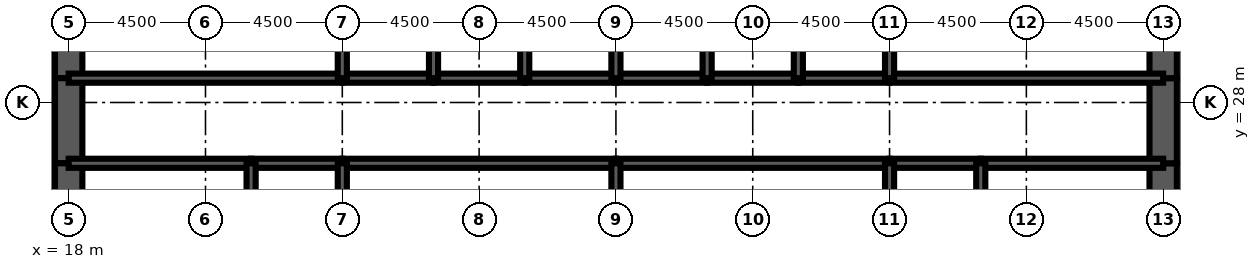
"""IFC4 building model, lengths in metres.
Left out: names, types, materials, properties, quantities, classifications, styles, units other than length and angle.
Written with IfcOpenShell. Run it as: python <this file> out.ifc"""

import sys

from ifc_helpers import new_model, si_unit, direction, frame, frame_2d, origin, place, context, subcontext, project, spatial, rectangle, extrude, element, fill, save


model = new_model("IFC4")
c1 = context("Model", 3, precision=1e-05, world=origin(), true_north=direction((0.0, 1.0)))
c2 = subcontext(c1, "Body", "Model", "MODEL_VIEW")
j1 = project(units=[si_unit("LENGTHUNIT", "METRE"), si_unit("PLANEANGLEUNIT", "RADIAN")], contexts=[c1])
p1 = place(None, origin())
s1 = spatial("IfcSite", under=j1, at=p1, CompositionType="ELEMENT")
p2 = place(p1, origin())
s2 = spatial("IfcBuilding", under=s1, at=p2, CompositionType="ELEMENT")
p3 = place(p2, frame((0.0, 0.0, 50.0)))
s3 = spatial("IfcBuildingStorey", under=s2, at=p3, CompositionType="ELEMENT", Elevation=50.0)
p4 = place(p3, frame((18.0, 32.0, 0.0), z_axis=(0.0, 0.0, 1.0), x_axis=(0.0, -1.0, 0.0)))
e1 = element("IfcWall", 1, at=p4, inside=s3, PredefinedType="SHEAR", context=c2, shape_type="SweptSolid", body=[
    extrude(rectangle(XDim=3.2, YDim=0.9, at=frame_2d((1.6, 0.0))), origin(), (0.0, 0.0, 1.0), 4.5),
])
p5 = place(p3, frame((18.0, 28.8, 0.0), z_axis=(0.0, 0.0, 1.0), x_axis=(0.0, -1.0, 0.0)))
e2 = element("IfcWall", 2, at=p5, inside=s3, PredefinedType="SHEAR", context=c2, shape_type="SweptSolid", body=[
    extrude(rectangle(XDim=2.8, YDim=0.9, at=frame_2d((1.4, 0.0))), origin(), (0.0, 0.0, 1.0), 4.5),
])
p6 = place(p5, frame((0.4, 0.0, 0.0)))
e3 = element("IfcOpeningElement", 3, at=p6, cuts=e2, PredefinedType="OPENING", context=c2, shape_type="SweptSolid", body=[
    extrude(rectangle(XDim=1.8, YDim=2.1, at=frame_2d((0.9, 1.05))), frame((0.0, 0.46, 0.0), z_axis=(0.0, -1.0, 0.0), x_axis=(1.0, 0.0, 0.0)), (0.0, 0.0, 1.0), 0.92),
])
for number, where, z_axis, x_axis in (
    (4, (18.0, 26.0, 0.0), (0.0, 0.0, 1.0), (0.0, -1.0, 0.0)),
    (5, (54.0, 22.0, 0.0), (0.0, 0.0, 1.0), (0.0, 1.0, 0.0)),
):
    element("IfcWall", number, at=place(p3, frame(where, z_axis=z_axis, x_axis=x_axis)), inside=s3, PredefinedType="SHEAR", context=c2, shape_type="SweptSolid", body=[
        extrude(rectangle(XDim=4.0, YDim=0.9, at=frame_2d((2.0, 0.0))), origin(), (0.0, 0.0, 1.0), 4.5),
    ])
p7 = place(p3, frame((54.0, 26.0, 0.0), z_axis=(0.0, 0.0, 1.0), x_axis=(0.0, 1.0, 0.0)))
e6 = element("IfcWall", 6, at=p7, inside=s3, PredefinedType="SHEAR", context=c2, shape_type="SweptSolid", body=[
    extrude(rectangle(XDim=2.8, YDim=0.9, at=frame_2d((1.4, 0.0))), origin(), (0.0, 0.0, 1.0), 4.5),
])
p8 = place(p7, frame((0.6, 0.0, 0.0)))
e7 = element("IfcOpeningElement", 7, at=p8, cuts=e6, PredefinedType="OPENING", context=c2, shape_type="SweptSolid", body=[
    extrude(rectangle(XDim=1.8, YDim=2.1, at=frame_2d((0.9, 1.05))), frame((0.0, 0.46, 0.0), z_axis=(0.0, -1.0, 0.0), x_axis=(1.0, 0.0, 0.0)), (0.0, 0.0, 1.0), 0.92),
])
p9 = place(p3, frame((54.0, 28.8, 0.0), z_axis=(0.0, 0.0, 1.0), x_axis=(0.0, 1.0, 0.0)))
e8 = element("IfcWall", 8, at=p9, inside=s3, PredefinedType="SHEAR", context=c2, shape_type="SweptSolid", body=[
    extrude(rectangle(XDim=3.2, YDim=0.9, at=frame_2d((1.6, 0.0))), origin(), (0.0, 0.0, 1.0), 4.5),
])
p10 = place(p3, frame((18.0, 28.8, 0.0), z_axis=(0.0, 0.0, 1.0), x_axis=(1.0, 0.0, 0.0)))
e9 = element("IfcWall", 9, at=p10, inside=s3, PredefinedType="SOLIDWALL", context=c2, shape_type="SweptSolid", body=[
    extrude(rectangle(XDim=9.0, YDim=0.3, at=frame_2d((4.5, 0.0))), origin(), (0.0, 0.0, 1.0), 4.5),
])
p11 = place(p10, frame((0.65, 0.0, 0.0)))
e10 = element("IfcOpeningElement", 10, at=p11, cuts=e9, PredefinedType="OPENING", context=c2, shape_type="SweptSolid", body=[
    extrude(rectangle(XDim=1.0, YDim=2.1, at=frame_2d((0.5, 1.05))), frame((0.0, 0.16, 0.0), z_axis=(0.0, -1.0, 0.0), x_axis=(1.0, 0.0, 0.0)), (0.0, 0.0, 1.0), 0.32),
])
p12 = place(p3, frame((27.0, 28.8, 0.0), z_axis=(0.0, 0.0, 1.0), x_axis=(1.0, 0.0, 0.0)))
e11 = element("IfcWall", 11, at=p12, inside=s3, PredefinedType="SOLIDWALL", context=c2, shape_type="SweptSolid", body=[
    extrude(rectangle(XDim=3.0, YDim=0.3, at=frame_2d((1.5, 0.0))), origin(), (0.0, 0.0, 1.0), 4.5),
])
p13 = place(p12, frame((0.95, 0.0, 0.0)))
e12 = element("IfcOpeningElement", 12, at=p13, cuts=e11, PredefinedType="OPENING", context=c2, shape_type="SweptSolid", body=[
    extrude(rectangle(XDim=1.1, YDim=2.2, at=frame_2d((0.55, 1.1))), frame((0.0, 0.16, 0.0), z_axis=(0.0, -1.0, 0.0), x_axis=(1.0, 0.0, 0.0)), (0.0, 0.0, 1.0), 0.32),
])
p14 = place(p3, frame((30.0, 28.8, 0.0), z_axis=(0.0, 0.0, 1.0), x_axis=(1.0, 0.0, 0.0)))
e13 = element("IfcWall", 13, at=p14, inside=s3, PredefinedType="SOLIDWALL", context=c2, shape_type="SweptSolid", body=[
    extrude(rectangle(XDim=3.0, YDim=0.3, at=frame_2d((1.5, 0.0))), origin(), (0.0, 0.0, 1.0), 4.5),
])
p15 = place(p14, frame((0.95, 0.0, 0.0)))
e14 = element("IfcOpeningElement", 14, at=p15, cuts=e13, PredefinedType="OPENING", context=c2, shape_type="SweptSolid", body=[
    extrude(rectangle(XDim=1.1, YDim=2.2, at=frame_2d((0.55, 1.1))), frame((0.0, 0.16, 0.0), z_axis=(0.0, -1.0, 0.0), x_axis=(1.0, 0.0, 0.0)), (0.0, 0.0, 1.0), 0.32),
])
p16 = place(p3, frame((33.0, 28.8, 0.0), z_axis=(0.0, 0.0, 1.0), x_axis=(1.0, 0.0, 0.0)))
e15 = element("IfcWall", 15, at=p16, inside=s3, PredefinedType="SOLIDWALL", context=c2, shape_type="SweptSolid", body=[
    extrude(rectangle(XDim=3.0, YDim=0.3, at=frame_2d((1.5, 0.0))), origin(), (0.0, 0.0, 1.0), 4.5),
])
p17 = place(p16, frame((0.95, 0.0, 0.0)))
e16 = element("IfcOpeningElement", 16, at=p17, cuts=e15, PredefinedType="OPENING", context=c2, shape_type="SweptSolid", body=[
    extrude(rectangle(XDim=1.1, YDim=2.2, at=frame_2d((0.55, 1.1))), frame((0.0, 0.16, 0.0), z_axis=(0.0, -1.0, 0.0), x_axis=(1.0, 0.0, 0.0)), (0.0, 0.0, 1.0), 0.32),
])
for number, where, z_axis, x_axis in (
    (17, (36.0, 28.8, 0.0), (0.0, 0.0, 1.0), (1.0, 0.0, 0.0)),
    (18, (39.0, 28.8, 0.0), (0.0, 0.0, 1.0), (1.0, 0.0, 0.0)),
):
    element("IfcWall", number, at=place(p3, frame(where, z_axis=z_axis, x_axis=x_axis)), inside=s3, PredefinedType="SOLIDWALL", context=c2, shape_type="SweptSolid", body=[
        extrude(rectangle(XDim=3.0, YDim=0.3, at=frame_2d((1.5, 0.0))), origin(), (0.0, 0.0, 1.0), 4.5),
    ])
p18 = place(p3, frame((42.0, 28.8, 0.0), z_axis=(0.0, 0.0, 1.0), x_axis=(1.0, 0.0, 0.0)))
e19 = element("IfcWall", 19, at=p18, inside=s3, PredefinedType="SOLIDWALL", context=c2, shape_type="SweptSolid", body=[
    extrude(rectangle(XDim=3.0, YDim=0.3, at=frame_2d((1.5, 0.0))), origin(), (0.0, 0.0, 1.0), 4.5),
])
p19 = place(p18, frame((0.95, 0.0, 0.0)))
e20 = element("IfcOpeningElement", 20, at=p19, cuts=e19, PredefinedType="OPENING", context=c2, shape_type="SweptSolid", body=[
    extrude(rectangle(XDim=1.1, YDim=2.2, at=frame_2d((0.55, 1.1))), frame((0.0, 0.16, 0.0), z_axis=(0.0, -1.0, 0.0), x_axis=(1.0, 0.0, 0.0)), (0.0, 0.0, 1.0), 0.32),
])
p20 = place(p3, frame((45.0, 28.8, 0.0), z_axis=(0.0, 0.0, 1.0), x_axis=(1.0, 0.0, 0.0)))
e21 = element("IfcWall", 21, at=p20, inside=s3, PredefinedType="SOLIDWALL", context=c2, shape_type="SweptSolid", body=[
    extrude(rectangle(XDim=9.0, YDim=0.3, at=frame_2d((4.5, 0.0))), origin(), (0.0, 0.0, 1.0), 4.5),
])
p21 = place(p20, frame((7.35, 0.0, 0.0)))
e22 = element("IfcOpeningElement", 22, at=p21, cuts=e21, PredefinedType="OPENING", context=c2, shape_type="SweptSolid", body=[
    extrude(rectangle(XDim=1.0, YDim=2.1, at=frame_2d((0.5, 1.05))), frame((0.0, 0.16, 0.0), z_axis=(0.0, -1.0, 0.0), x_axis=(1.0, 0.0, 0.0)), (0.0, 0.0, 1.0), 0.32),
])
p22 = place(p3, frame((18.0, 26.0, 0.0), z_axis=(0.0, 0.0, 1.0), x_axis=(1.0, 0.0, 0.0)))
e23 = element("IfcWall", 23, at=p22, inside=s3, PredefinedType="SOLIDWALL", context=c2, shape_type="SweptSolid", body=[
    extrude(rectangle(XDim=6.0, YDim=0.3, at=frame_2d((3.0, 0.0))), origin(), (0.0, 0.0, 1.0), 4.5),
])
p23 = place(p3, frame((24.0, 26.0, 0.0), z_axis=(0.0, 0.0, 1.0), x_axis=(1.0, 0.0, 0.0)))
e24 = element("IfcWall", 24, at=p23, inside=s3, PredefinedType="SOLIDWALL", context=c2, shape_type="SweptSolid", body=[
    extrude(rectangle(XDim=3.0, YDim=0.3, at=frame_2d((1.5, 0.0))), origin(), (0.0, 0.0, 1.0), 4.5),
])
for number, where, z_axis, x_axis in (
    (25, (27.0, 26.0, 0.0), (0.0, 0.0, 1.0), (1.0, 0.0, 0.0)),
    (26, (36.0, 26.0, 0.0), (0.0, 0.0, 1.0), (1.0, 0.0, 0.0)),
):
    element("IfcWall", number, at=place(p3, frame(where, z_axis=z_axis, x_axis=x_axis)), inside=s3, PredefinedType="SOLIDWALL", context=c2, shape_type="SweptSolid", body=[
        extrude(rectangle(XDim=9.0, YDim=0.3, at=frame_2d((4.5, 0.0))), origin(), (0.0, 0.0, 1.0), 4.5),
    ])
p24 = place(p3, frame((45.0, 26.0, 0.0), z_axis=(0.0, 0.0, 1.0), x_axis=(1.0, 0.0, 0.0)))
e27 = element("IfcWall", 27, at=p24, inside=s3, PredefinedType="SOLIDWALL", context=c2, shape_type="SweptSolid", body=[
    extrude(rectangle(XDim=3.0, YDim=0.3, at=frame_2d((1.5, 0.0))), origin(), (0.0, 0.0, 1.0), 4.5),
])
p25 = place(p3, frame((48.0, 26.0, 0.0), z_axis=(0.0, 0.0, 1.0), x_axis=(1.0, 0.0, 0.0)))
e28 = element("IfcWall", 28, at=p25, inside=s3, PredefinedType="SOLIDWALL", context=c2, shape_type="SweptSolid", body=[
    extrude(rectangle(XDim=6.0, YDim=0.3, at=frame_2d((3.0, 0.0))), origin(), (0.0, 0.0, 1.0), 4.5),
])
for number, where, z_axis, x_axis in (
    (29, (27.0, 28.8, 0.0), (0.0, 0.0, 1.0), (0.0, 1.0, 0.0)),
    (30, (30.0, 28.8, 0.0), (0.0, 0.0, 1.0), (0.0, 1.0, 0.0)),
    (31, (33.0, 28.8, 0.0), (0.0, 0.0, 1.0), (0.0, 1.0, 0.0)),
    (32, (36.0, 28.8, 0.0), (0.0, 0.0, 1.0), (0.0, 1.0, 0.0)),
    (33, (39.0, 28.8, 0.0), (0.0, 0.0, 1.0), (0.0, 1.0, 0.0)),
    (34, (42.0, 28.8, 0.0), (0.0, 0.0, 1.0), (0.0, 1.0, 0.0)),
    (35, (45.0, 28.8, 0.0), (0.0, 0.0, 1.0), (0.0, 1.0, 0.0)),
):
    element("IfcWall", number, at=place(p3, frame(where, z_axis=z_axis, x_axis=x_axis)), inside=s3, PredefinedType="SOLIDWALL", context=c2, shape_type="SweptSolid", body=[
        extrude(rectangle(XDim=3.2, YDim=0.3, at=frame_2d((1.6, 0.0))), origin(), (0.0, 0.0, 1.0), 4.5),
    ])
for number, where, z_axis, x_axis in (
    (36, (24.0, 22.0, 0.0), (0.0, 0.0, 1.0), (0.0, 1.0, 0.0)),
    (37, (27.0, 22.0, 0.0), (0.0, 0.0, 1.0), (0.0, 1.0, 0.0)),
    (38, (36.0, 22.0, 0.0), (0.0, 0.0, 1.0), (0.0, 1.0, 0.0)),
    (39, (45.0, 22.0, 0.0), (0.0, 0.0, 1.0), (0.0, 1.0, 0.0)),
    (40, (48.0, 22.0, 0.0), (0.0, 0.0, 1.0), (0.0, 1.0, 0.0)),
):
    element("IfcWall", number, at=place(p3, frame(where, z_axis=z_axis, x_axis=x_axis)), inside=s3, PredefinedType="SOLIDWALL", context=c2, shape_type="SweptSolid", body=[
        extrude(rectangle(XDim=4.0, YDim=0.3, at=frame_2d((2.0, 0.0))), origin(), (0.0, 0.0, 1.0), 4.5),
    ])
p26 = place(p3, frame((38.0, 22.15, 0.0), z_axis=(0.0, 0.0, 1.0), x_axis=(0.0, 1.0, 0.0)))
e41 = element("IfcWall", 41, at=p26, inside=s3, PredefinedType="PARTITIONING", context=c2, shape_type="SweptSolid", body=[
    extrude(rectangle(XDim=3.7, YDim=0.15, at=frame_2d((1.85, 0.0))), origin(), (0.0, 0.0, 1.0), 3.0),
])
p27 = place(p26, frame((2.2, 0.0, 0.0)))
e42 = element("IfcOpeningElement", 42, at=p27, cuts=e41, PredefinedType="OPENING", context=c2, shape_type="SweptSolid", body=[
    extrude(rectangle(XDim=1.0, YDim=2.1, at=frame_2d((0.5, 1.05))), frame((0.0, 0.085, 0.0), z_axis=(0.0, -1.0, 0.0), x_axis=(1.0, 0.0, 0.0)), (0.0, 0.0, 1.0), 0.17),
])
p28 = place(p3, frame((51.975, 22.15, 0.0), z_axis=(0.0, 0.0, 1.0), x_axis=(0.0, 1.0, 0.0)))
e43 = element("IfcWall", 43, at=p28, inside=s3, PredefinedType="PARTITIONING", context=c2, shape_type="SweptSolid", body=[
    extrude(rectangle(XDim=3.7, YDim=0.15, at=frame_2d((1.85, 0.0))), origin(), (0.0, 0.0, 1.0), 3.0),
])
p29 = place(p27, origin())
e44 = element("IfcDoor", 44, at=p29, inside=s3, OperationType="SINGLE_SWING_RIGHT", PredefinedType="DOOR", context=c2, shape_type="SweptSolid", body=[
    extrude(rectangle(XDim=1.0, YDim=2.1, at=frame_2d((0.5, 1.05))), frame((0.0, 0.025, 0.0), z_axis=(0.0, -1.0, 0.0), x_axis=(1.0, 0.0, 0.0)), (0.0, 0.0, 1.0), 0.05),
])
fill(e42, e44)
p30 = place(p19, origin())
e45 = element("IfcDoor", 45, at=p30, inside=s3, OperationType="DOUBLE_DOOR_SLIDING", PredefinedType="USERDEFINED", context=c2, shape_type="SweptSolid", body=[
    extrude(rectangle(XDim=1.1, YDim=2.2, at=frame_2d((0.55, 1.1))), frame((0.0, 0.025, 0.0), z_axis=(0.0, -1.0, 0.0), x_axis=(1.0, 0.0, 0.0)), (0.0, 0.0, 1.0), 0.05),
])
fill(e20, e45)
p31 = place(p13, origin())
e46 = element("IfcDoor", 46, at=p31, inside=s3, OperationType="DOUBLE_DOOR_SLIDING", PredefinedType="USERDEFINED", context=c2, shape_type="SweptSolid", body=[
    extrude(rectangle(XDim=1.1, YDim=2.2, at=frame_2d((0.55, 1.1))), frame((0.0, 0.025, 0.0), z_axis=(0.0, -1.0, 0.0), x_axis=(1.0, 0.0, 0.0)), (0.0, 0.0, 1.0), 0.05),
])
fill(e12, e46)
p32 = place(p15, origin())
e47 = element("IfcDoor", 47, at=p32, inside=s3, OperationType="DOUBLE_DOOR_SLIDING", PredefinedType="USERDEFINED", context=c2, shape_type="SweptSolid", body=[
    extrude(rectangle(XDim=1.1, YDim=2.2, at=frame_2d((0.55, 1.1))), frame((0.0, 0.025, 0.0), z_axis=(0.0, -1.0, 0.0), x_axis=(1.0, 0.0, 0.0)), (0.0, 0.0, 1.0), 0.05),
])
fill(e14, e47)
p33 = place(p17, origin())
e48 = element("IfcDoor", 48, at=p33, inside=s3, OperationType="DOUBLE_DOOR_SLIDING", PredefinedType="USERDEFINED", context=c2, shape_type="SweptSolid", body=[
    extrude(rectangle(XDim=1.1, YDim=2.2, at=frame_2d((0.55, 1.1))), frame((0.0, 0.025, 0.0), z_axis=(0.0, -1.0, 0.0), x_axis=(1.0, 0.0, 0.0)), (0.0, 0.0, 1.0), 0.05),
])
fill(e16, e48)
p34 = place(p11, origin())
e49 = element("IfcDoor", 49, at=p34, inside=s3, OperationType="SINGLE_SWING_LEFT", PredefinedType="DOOR", context=c2, shape_type="SweptSolid", body=[
    extrude(rectangle(XDim=1.0, YDim=2.1, at=frame_2d((0.5, 1.05))), frame((0.0, 0.025, 0.0), z_axis=(0.0, -1.0, 0.0), x_axis=(1.0, 0.0, 0.0)), (0.0, 0.0, 1.0), 0.05),
])
fill(e10, e49)
p35 = place(p21, origin())
e50 = element("IfcDoor", 50, at=p35, inside=s3, OperationType="SINGLE_SWING_RIGHT", PredefinedType="DOOR", context=c2, shape_type="SweptSolid", body=[
    extrude(rectangle(XDim=1.0, YDim=2.1, at=frame_2d((0.5, 1.05))), frame((0.0, 0.025, 0.0), z_axis=(0.0, -1.0, 0.0), x_axis=(1.0, 0.0, 0.0)), (0.0, 0.0, 1.0), 0.05),
])
fill(e22, e50)
p36 = place(p6, origin())
e51 = element("IfcDoor", 51, at=p36, inside=s3, OperationType="SINGLE_SWING_LEFT", PredefinedType="DOOR", context=c2, shape_type="SweptSolid", body=[
    extrude(rectangle(XDim=1.8, YDim=2.1, at=frame_2d((0.9, 1.05))), frame((0.0, 0.45, 0.0), z_axis=(0.0, -1.0, 0.0), x_axis=(1.0, 0.0, 0.0)), (0.0, 0.0, 1.0), 0.899),
])
fill(e3, e51)
p37 = place(p8, origin())
e52 = element("IfcDoor", 52, at=p37, inside=s3, OperationType="SINGLE_SWING_LEFT", PredefinedType="DOOR", context=c2, shape_type="SweptSolid", body=[
    extrude(rectangle(XDim=1.8, YDim=2.1, at=frame_2d((0.9, 1.05))), frame((0.0, 0.45, 0.0), z_axis=(0.0, -1.0, 0.0), x_axis=(1.0, 0.0, 0.0)), (0.0, 0.0, 1.0), 0.899),
])
fill(e7, e52)
save(model, sys.argv[1])
